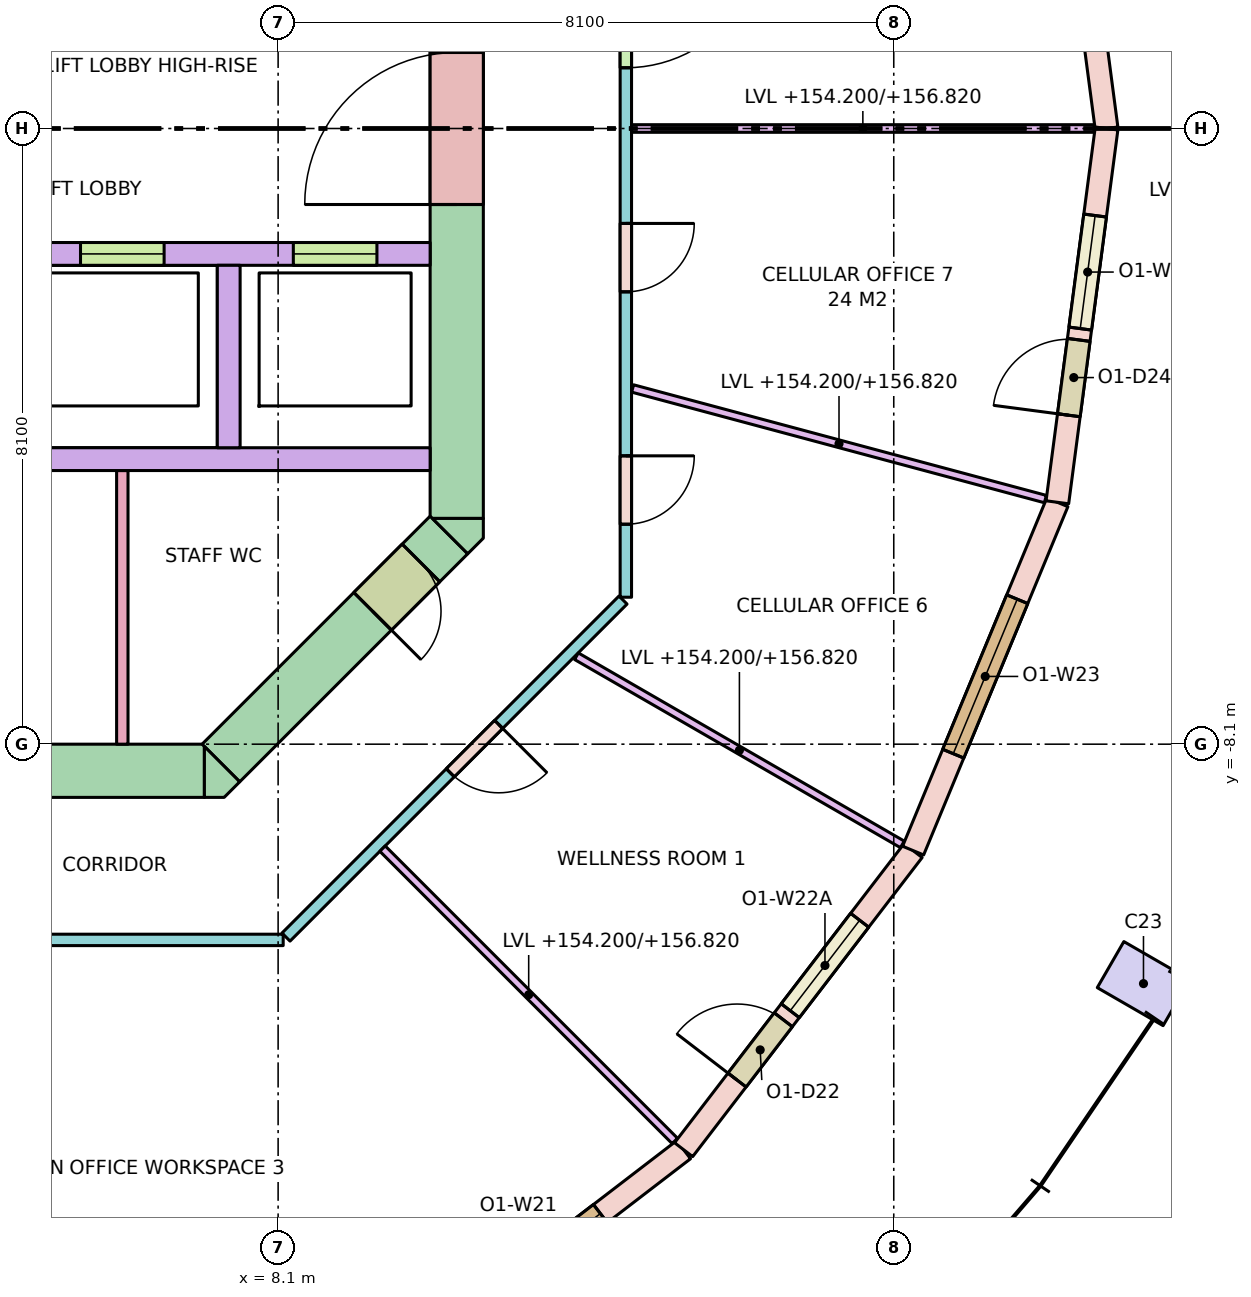
"""IFC4 building model, lengths in metres.
Left out: names, types, materials, properties, quantities, classifications, styles, units other than length and angle.
Written with IfcOpenShell. Run it as: python <this file> out.ifc"""

import sys

from ifc_helpers import new_model, si_unit, direction, frame, frame_2d, origin, origin_2d, place, context, subcontext, project, spatial, polyline, rectangle, outline, extrude, element, fill, save


model = new_model("IFC4")
c1 = context("Model", 3, precision=1e-05, world=origin(), true_north=direction((0.0, 1.0)))
c2 = subcontext(c1, "Body", "Model", "MODEL_VIEW")
j1 = project(units=[si_unit("LENGTHUNIT", "METRE"), si_unit("PLANEANGLEUNIT", "RADIAN")], contexts=[c1])
p1 = place(None, origin())
s1 = spatial("IfcSite", under=j1, at=p1, CompositionType="ELEMENT")
p2 = place(p1, origin())
s2 = spatial("IfcBuilding", under=s1, at=p2, CompositionType="ELEMENT")
p3 = place(p2, frame((0.0, 0.0, 154.2)))
s3 = spatial("IfcBuildingStorey", under=s2, at=p3, CompositionType="ELEMENT", Elevation=154.2)
p4 = place(p3, frame((19.486, -11.25, 0.0), z_axis=(0.0, 0.0, 1.0), x_axis=(0.5, 0.866025403784, 0.0)))
e1 = element("IfcColumn", 1, at=p4, inside=s3, PredefinedType="COLUMN", context=c2, shape_type="SweptSolid", body=[
    extrude(rectangle(XDim=0.7, YDim=1.0, at=origin_2d()), origin(), (0.0, 0.0, 1.0), 3.7),
])
p5 = place(p3, frame((-7.13, -8.45, -0.28), z_axis=(0.0, 0.0, 1.0), x_axis=(1.0, 0.0, 0.0)))
e2 = element("IfcWall", 2, at=p5, inside=s3, PredefinedType="SHEAR", context=c2, shape_type="SweptSolid", body=[
    extrude(rectangle(XDim=14.26, YDim=0.7, at=frame_2d((7.13, 0.0))), origin(), (0.0, 0.0, 1.0), 3.7),
])
p6 = place(p5, frame((8.08, 0.0, 0.28)))
e3 = element("IfcOpeningElement", 3, at=p6, cuts=e2, PredefinedType="OPENING", context=c2, shape_type="SweptSolid", body=[
    extrude(rectangle(XDim=0.7, YDim=2.1, at=frame_2d((0.35, 1.05))), frame((0.0, 0.36, 0.0), z_axis=(0.0, -1.0, 0.0), x_axis=(1.0, 0.0, 0.0)), (0.0, 0.0, 1.0), 0.72),
])
p7 = place(p5, frame((6.205, 0.0, 0.28)))
e4 = element("IfcOpeningElement", 4, at=p7, cuts=e2, PredefinedType="OPENING", context=c2, shape_type="SweptSolid", body=[
    extrude(rectangle(XDim=0.9, YDim=2.1, at=frame_2d((0.45, 1.05))), frame((0.0, 0.36, 0.0), z_axis=(0.0, -1.0, 0.0), x_axis=(1.0, 0.0, 0.0)), (0.0, 0.0, 1.0), 0.72),
])
p8 = place(p5, frame((10.667, 0.0, 0.28)))
e5 = element("IfcOpeningElement", 5, at=p8, cuts=e2, PredefinedType="OPENING", context=c2, shape_type="SweptSolid", body=[
    extrude(rectangle(XDim=0.9, YDim=2.1, at=frame_2d((0.45, 1.05))), frame((0.0, 0.36, 0.0), z_axis=(0.0, -1.0, 0.0), x_axis=(1.0, 0.0, 0.0)), (0.0, 0.0, 1.0), 0.72),
])
p9 = place(p3, frame((10.45, -5.13, -0.28), z_axis=(0.0, 0.0, 1.0), x_axis=(0.0, 1.0, 0.0)))
e6 = element("IfcWall", 6, at=p9, inside=s3, PredefinedType="SHEAR", context=c2, shape_type="SweptSolid", body=[
    extrude(rectangle(XDim=10.26, YDim=0.7, at=frame_2d((5.13, 0.0))), origin(), (0.0, 0.0, 1.0), 3.7),
])
p10 = place(p9, frame((4.13, 0.0, 0.28)))
e7 = element("IfcOpeningElement", 7, at=p10, cuts=e6, PredefinedType="OPENING", context=c2, shape_type="SweptSolid", body=[
    extrude(rectangle(XDim=2.0, YDim=2.1, at=frame_2d((1.0, 1.05))), frame((0.0, 0.36, 0.0), z_axis=(0.0, -1.0, 0.0), x_axis=(1.0, 0.0, 0.0)), (0.0, 0.0, 1.0), 0.72),
])
p11 = place(p3, frame((10.347, -5.347, -0.28), z_axis=(0.0, 0.0, 1.0), x_axis=(-0.707106781187, -0.707106781187, 0.0)))
e8 = element("IfcWall", 8, at=p11, inside=s3, PredefinedType="SHEAR", context=c2, shape_type="SweptSolid", body=[
    extrude(rectangle(XDim=4.243, YDim=0.7, at=frame_2d((2.121, 0.0))), origin(), (0.0, 0.0, 1.0), 3.7),
])
p12 = place(p11, frame((0.52, 0.0, 0.28)))
e9 = element("IfcOpeningElement", 9, at=p12, cuts=e8, PredefinedType="OPENING", context=c2, shape_type="SweptSolid", body=[
    extrude(rectangle(XDim=0.9, YDim=2.1, at=frame_2d((0.45, 1.05))), frame((0.0, 0.36, 0.0), z_axis=(0.0, -1.0, 0.0), x_axis=(1.0, 0.0, 0.0)), (0.0, 0.0, 1.0), 0.72),
])
p13 = place(p3, frame((0.0, 0.0, -0.28)))
e10 = element("IfcWall", 10, at=p13, inside=s3, PredefinedType="SHEAR", context=c2, shape_type="SweptSolid", body=[
    extrude(outline(polyline([(7.39, -8.8), (7.13, -8.8), (7.13, -8.8), (7.13, -8.13), (7.595, -8.595), (7.595, -8.595), (7.595, -8.595), (7.39, -8.8)])), origin(), (0.0, 0.0, 1.0), 3.7),
])
p14 = place(p3, frame((0.0, 0.0, -0.28)))
e11 = element("IfcWall", 11, at=p14, inside=s3, PredefinedType="SHEAR", context=c2, shape_type="SweptSolid", body=[
    extrude(outline(polyline([(10.8, -5.39), (10.595, -5.595), (10.595, -5.595), (10.595, -5.595), (10.13, -5.13), (10.8, -5.13), (10.8, -5.13), (10.8, -5.39)])), origin(), (0.0, 0.0, 1.0), 3.7),
])
p15 = place(p3, frame((2.0, -4.35, 0.0), z_axis=(0.0, 0.0, 1.0), x_axis=(1.0, 0.0, 0.0)))
e12 = element("IfcWall", 12, at=p15, inside=s3, PredefinedType="SOLIDWALL", context=c2, shape_type="SweptSolid", body=[
    extrude(rectangle(XDim=8.1, YDim=0.3, at=frame_2d((4.05, 0.0))), origin(), (0.0, 0.0, 1.0), 3.42),
])
p16 = place(p3, frame((2.0, -1.65, 0.0), z_axis=(0.0, 0.0, 1.0), x_axis=(1.0, 0.0, 0.0)))
e13 = element("IfcWall", 13, at=p16, inside=s3, PredefinedType="SOLIDWALL", context=c2, shape_type="SweptSolid", body=[
    extrude(rectangle(XDim=8.1, YDim=0.3, at=frame_2d((4.05, 0.0))), origin(), (0.0, 0.0, 1.0), 3.42),
])
p17 = place(p16, frame((0.85, 0.0, 0.0)))
e14 = element("IfcOpeningElement", 14, at=p17, cuts=e13, PredefinedType="OPENING", context=c2, shape_type="SweptSolid", body=[
    extrude(rectangle(XDim=1.1, YDim=2.1, at=frame_2d((0.55, 1.05))), frame((0.0, 0.16, 0.0), z_axis=(0.0, -1.0, 0.0), x_axis=(1.0, 0.0, 0.0)), (0.0, 0.0, 1.0), 0.32),
])
p18 = place(p16, frame((3.5, 0.0, 0.0)))
e15 = element("IfcOpeningElement", 15, at=p18, cuts=e13, PredefinedType="OPENING", context=c2, shape_type="SweptSolid", body=[
    extrude(rectangle(XDim=1.1, YDim=2.1, at=frame_2d((0.55, 1.05))), frame((0.0, 0.16, 0.0), z_axis=(0.0, -1.0, 0.0), x_axis=(1.0, 0.0, 0.0)), (0.0, 0.0, 1.0), 0.32),
])
p19 = place(p16, frame((6.3, 0.0, 0.0)))
e16 = element("IfcOpeningElement", 16, at=p19, cuts=e13, PredefinedType="OPENING", context=c2, shape_type="SweptSolid", body=[
    extrude(rectangle(XDim=1.1, YDim=2.1, at=frame_2d((0.55, 1.05))), frame((0.0, 0.16, 0.0), z_axis=(0.0, -1.0, 0.0), x_axis=(1.0, 0.0, 0.0)), (0.0, 0.0, 1.0), 0.32),
])
p20 = place(p3, frame((7.45, -4.2, 0.0), z_axis=(0.0, 0.0, 1.0), x_axis=(0.0, 1.0, 0.0)))
e17 = element("IfcWall", 17, at=p20, inside=s3, PredefinedType="SOLIDWALL", context=c2, shape_type="SweptSolid", body=[
    extrude(rectangle(XDim=2.4, YDim=0.3, at=frame_2d((1.2, 0.0))), origin(), (0.0, 0.0, 1.0), 3.42),
])
p21 = place(p3, frame((19.0, 0.0, 0.0), z_axis=(0.0, 0.0, 1.0), x_axis=(-0.130538549191, 0.991443234469, 0.0)))
e18 = element("IfcWall", 18, at=p21, inside=s3, PredefinedType="STANDARD", context=c2, shape_type="SweptSolid", body=[
    extrude(rectangle(XDim=4.96, YDim=0.3, at=frame_2d((2.48, 0.0))), origin(), (0.0, 0.0, 1.0), 3.42),
])
p22 = place(p21, frame((1.38, 0.0, 0.8)))
e19 = element("IfcOpeningElement", 19, at=p22, cuts=e18, PredefinedType="OPENING", context=c2, shape_type="SweptSolid", body=[
    extrude(rectangle(XDim=2.2, YDim=2.4, at=frame_2d((1.1, 1.2))), frame((0.0, 0.16, 0.0), z_axis=(0.0, -1.0, 0.0), x_axis=(1.0, 0.0, 0.0)), (0.0, 0.0, 1.0), 0.32),
])
p23 = place(p3, frame((9.5, -16.455, 0.0), z_axis=(0.0, 0.0, 1.0), x_axis=(0.793348024649, 0.608768356425, 0.0)))
e20 = element("IfcWall", 20, at=p23, inside=s3, PredefinedType="STANDARD", context=c2, shape_type="SweptSolid", body=[
    extrude(rectangle(XDim=4.96, YDim=0.3, at=frame_2d((2.48, 0.0))), origin(), (0.0, 0.0, 1.0), 3.42),
])
p24 = place(p23, frame((1.38, 0.0, 0.8)))
e21 = element("IfcOpeningElement", 21, at=p24, cuts=e20, PredefinedType="OPENING", context=c2, shape_type="SweptSolid", body=[
    extrude(rectangle(XDim=2.2, YDim=2.4, at=frame_2d((1.1, 1.2))), frame((0.0, 0.16, 0.0), z_axis=(0.0, -1.0, 0.0), x_axis=(1.0, 0.0, 0.0)), (0.0, 0.0, 1.0), 0.32),
])
p25 = place(p3, frame((13.435, -13.435, 0.0), z_axis=(0.0, 0.0, 1.0), x_axis=(0.608768356425, 0.793348024649, 0.0)))
e22 = element("IfcWall", 22, at=p25, inside=s3, PredefinedType="STANDARD", context=c2, shape_type="SweptSolid", body=[
    extrude(rectangle(XDim=4.96, YDim=0.3, at=frame_2d((2.48, 0.0))), origin(), (0.0, 0.0, 1.0), 3.42),
])
p26 = place(p25, frame((1.155, 0.0, 0.0)))
e23 = element("IfcOpeningElement", 23, at=p26, cuts=e22, PredefinedType="OPENING", context=c2, shape_type="SweptSolid", body=[
    extrude(rectangle(XDim=1.0, YDim=2.4, at=frame_2d((0.5, 1.2))), frame((0.0, 0.16, 0.0), z_axis=(0.0, -1.0, 0.0), x_axis=(1.0, 0.0, 0.0)), (0.0, 0.0, 1.0), 0.32),
])
p27 = place(p25, frame((2.305, 0.0, 0.8)))
e24 = element("IfcOpeningElement", 24, at=p27, cuts=e22, PredefinedType="OPENING", context=c2, shape_type="SweptSolid", body=[
    extrude(rectangle(XDim=1.5, YDim=2.4, at=frame_2d((0.75, 1.2))), frame((0.0, 0.16, 0.0), z_axis=(0.0, -1.0, 0.0), x_axis=(1.0, 0.0, 0.0)), (0.0, 0.0, 1.0), 0.32),
])
p28 = place(p3, frame((16.455, -9.5, 0.0), z_axis=(0.0, 0.0, 1.0), x_axis=(0.382650301762, 0.923893254961, 0.0)))
e25 = element("IfcWall", 25, at=p28, inside=s3, PredefinedType="STANDARD", context=c2, shape_type="SweptSolid", body=[
    extrude(rectangle(XDim=4.96, YDim=0.3, at=frame_2d((2.48, 0.0))), origin(), (0.0, 0.0, 1.0), 3.42),
])
p29 = place(p28, frame((1.38, 0.0, 0.8)))
e26 = element("IfcOpeningElement", 26, at=p29, cuts=e25, PredefinedType="OPENING", context=c2, shape_type="SweptSolid", body=[
    extrude(rectangle(XDim=2.2, YDim=2.4, at=frame_2d((1.1, 1.2))), frame((0.0, 0.16, 0.0), z_axis=(0.0, -1.0, 0.0), x_axis=(1.0, 0.0, 0.0)), (0.0, 0.0, 1.0), 0.32),
])
p30 = place(p3, frame((18.353, -4.917, 0.0), z_axis=(0.0, 0.0, 1.0), x_axis=(0.130538549191, 0.991443234469, 0.0)))
e27 = element("IfcWall", 27, at=p30, inside=s3, PredefinedType="STANDARD", context=c2, shape_type="SweptSolid", body=[
    extrude(rectangle(XDim=4.96, YDim=0.3, at=frame_2d((2.48, 0.0))), origin(), (0.0, 0.0, 1.0), 3.42),
])
p31 = place(p30, frame((1.155, 0.0, 0.0)))
e28 = element("IfcOpeningElement", 28, at=p31, cuts=e27, PredefinedType="OPENING", context=c2, shape_type="SweptSolid", body=[
    extrude(rectangle(XDim=1.0, YDim=2.4, at=frame_2d((0.5, 1.2))), frame((0.0, 0.16, 0.0), z_axis=(0.0, -1.0, 0.0), x_axis=(1.0, 0.0, 0.0)), (0.0, 0.0, 1.0), 0.32),
])
p32 = place(p30, frame((2.305, 0.0, 0.8)))
e29 = element("IfcOpeningElement", 29, at=p32, cuts=e27, PredefinedType="OPENING", context=c2, shape_type="SweptSolid", body=[
    extrude(rectangle(XDim=1.5, YDim=2.4, at=frame_2d((0.75, 1.2))), frame((0.0, 0.16, 0.0), z_axis=(0.0, -1.0, 0.0), x_axis=(1.0, 0.0, 0.0)), (0.0, 0.0, 1.0), 0.32),
])
p33 = place(p3, frame((6.05, -8.1, 0.0), z_axis=(0.0, 0.0, 1.0), x_axis=(0.0, 1.0, 0.0)))
e30 = element("IfcWall", 30, at=p33, inside=s3, PredefinedType="PARTITIONING", context=c2, shape_type="SweptSolid", body=[
    extrude(rectangle(XDim=3.6, YDim=0.15, at=frame_2d((1.8, 0.0))), origin(), (0.0, 0.0, 1.0), 3.42),
])
p34 = place(p3, frame((12.638, -6.204, 0.0), z_axis=(0.0, 0.0, 1.0), x_axis=(-0.707106781187, -0.707106781187, 0.0)))
e31 = element("IfcWall", 31, at=p34, inside=s3, PredefinedType="PARTITIONING", context=c2, shape_type="SweptSolid", body=[
    extrude(rectangle(XDim=6.271, YDim=0.15, at=frame_2d((3.135, 0.0))), origin(), (0.0, 0.0, 1.0), 2.62),
])
p35 = place(p34, frame((2.314, 0.0, 0.0)))
e32 = element("IfcOpeningElement", 32, at=p35, cuts=e31, PredefinedType="OPENING", context=c2, shape_type="SweptSolid", body=[
    extrude(rectangle(XDim=0.9, YDim=2.1, at=frame_2d((0.45, 1.05))), frame((0.0, 0.085, 0.0), z_axis=(0.0, -1.0, 0.0), x_axis=(1.0, 0.0, 0.0)), (0.0, 0.0, 1.0), 0.17),
])
p36 = place(p3, frame((8.167, -10.675, 0.0), z_axis=(0.0, 0.0, 1.0), x_axis=(-1.0, 0.0, 0.0)))
e33 = element("IfcWall", 33, at=p36, inside=s3, PredefinedType="PARTITIONING", context=c2, shape_type="SweptSolid", body=[
    extrude(rectangle(XDim=11.027, YDim=0.15, at=frame_2d((5.513, 0.0))), origin(), (0.0, 0.0, 1.0), 2.62),
])
p37 = place(p36, frame((4.614, 0.0, 0.0)))
e34 = element("IfcOpeningElement", 34, at=p37, cuts=e33, PredefinedType="OPENING", context=c2, shape_type="SweptSolid", body=[
    extrude(rectangle(XDim=1.8, YDim=2.1, at=frame_2d((0.9, 1.05))), frame((0.0, 0.085, 0.0), z_axis=(0.0, -1.0, 0.0), x_axis=(1.0, 0.0, 0.0)), (0.0, 0.0, 1.0), 0.17),
])
p38 = place(p3, frame((12.675, 6.167, 0.0), z_axis=(0.0, 0.0, 1.0), x_axis=(0.0, -1.0, 0.0)))
e35 = element("IfcWall", 35, at=p38, inside=s3, PredefinedType="PARTITIONING", context=c2, shape_type="SweptSolid", body=[
    extrude(rectangle(XDim=12.333, YDim=0.15, at=frame_2d((6.167, 0.0))), origin(), (0.0, 0.0, 1.0), 2.62),
])
p39 = place(p38, frame((3.568, 0.0, 0.0)))
e36 = element("IfcOpeningElement", 36, at=p39, cuts=e35, PredefinedType="OPENING", context=c2, shape_type="SweptSolid", body=[
    extrude(rectangle(XDim=1.8, YDim=2.1, at=frame_2d((0.9, 1.05))), frame((0.0, 0.085, 0.0), z_axis=(0.0, -1.0, 0.0), x_axis=(1.0, 0.0, 0.0)), (0.0, 0.0, 1.0), 0.17),
])
p40 = place(p38, frame((0.96, 0.0, 0.0)))
e37 = element("IfcOpeningElement", 37, at=p40, cuts=e35, PredefinedType="OPENING", context=c2, shape_type="SweptSolid", body=[
    extrude(rectangle(XDim=0.9, YDim=2.1, at=frame_2d((0.45, 1.05))), frame((0.0, 0.085, 0.0), z_axis=(0.0, -1.0, 0.0), x_axis=(1.0, 0.0, 0.0)), (0.0, 0.0, 1.0), 0.17),
])
p41 = place(p38, frame((10.473, 0.0, 0.0)))
e38 = element("IfcOpeningElement", 38, at=p41, cuts=e35, PredefinedType="OPENING", context=c2, shape_type="SweptSolid", body=[
    extrude(rectangle(XDim=0.9, YDim=2.1, at=frame_2d((0.45, 1.05))), frame((0.0, 0.085, 0.0), z_axis=(0.0, -1.0, 0.0), x_axis=(1.0, 0.0, 0.0)), (0.0, 0.0, 1.0), 0.17),
])
p42 = place(p38, frame((7.416, 0.0, 0.0)))
e39 = element("IfcOpeningElement", 39, at=p42, cuts=e35, PredefinedType="OPENING", context=c2, shape_type="SweptSolid", body=[
    extrude(rectangle(XDim=0.9, YDim=2.1, at=frame_2d((0.45, 1.05))), frame((0.0, 0.085, 0.0), z_axis=(0.0, -1.0, 0.0), x_axis=(1.0, 0.0, 0.0)), (0.0, 0.0, 1.0), 0.17),
])
p43 = place(p3, frame((12.75, 0.0, 0.0), z_axis=(0.0, 0.0, 1.0), x_axis=(1.0, 0.0, 0.0)))
e40 = element("IfcWall", 40, at=p43, inside=s3, PredefinedType="PARTITIONING", context=c2, shape_type="SweptSolid", body=[
    extrude(rectangle(XDim=6.087, YDim=0.1, at=frame_2d((3.043, 0.0))), origin(), (0.0, 0.0, 1.0), 2.62),
])
p44 = place(p3, frame((9.474, -9.474, 0.0), z_axis=(0.0, 0.0, 1.0), x_axis=(0.707106781187, -0.707106781187, 0.0)))
e41 = element("IfcWall", 41, at=p44, inside=s3, PredefinedType="PARTITIONING", context=c2, shape_type="SweptSolid", body=[
    extrude(rectangle(XDim=5.439, YDim=0.1, at=frame_2d((2.719, 0.0))), origin(), (0.0, 0.0, 1.0), 2.62),
])
p45 = place(p3, frame((12.025, -6.943, 0.0), z_axis=(0.0, 0.0, 1.0), x_axis=(0.866025463095, -0.499999897272, 0.0)))
e42 = element("IfcWall", 42, at=p45, inside=s3, PredefinedType="PARTITIONING", context=c2, shape_type="SweptSolid", body=[
    extrude(rectangle(XDim=4.951, YDim=0.1, at=frame_2d((2.476, 0.0))), origin(), (0.0, 0.0, 1.0), 2.62),
])
p46 = place(p3, frame((12.764, -3.42, 0.0), z_axis=(0.0, 0.0, 1.0), x_axis=(0.965925759926, -0.258819292773, 0.0)))
e43 = element("IfcWall", 43, at=p46, inside=s3, PredefinedType="PARTITIONING", context=c2, shape_type="SweptSolid", body=[
    extrude(rectangle(XDim=5.622, YDim=0.1, at=frame_2d((2.811, 0.0))), origin(), (0.0, 0.0, 1.0), 2.62),
])
p47 = place(p24, origin())
e44 = element("IfcWindow", 44, at=p47, inside=s3, PartitioningType="SINGLE_PANEL", PredefinedType="WINDOW", context=c2, shape_type="SweptSolid", body=[
    extrude(rectangle(XDim=2.2, YDim=2.4, at=frame_2d((1.1, 1.2))), frame((0.0, 0.03, 0.0), z_axis=(0.0, -1.0, 0.0), x_axis=(1.0, 0.0, 0.0)), (0.0, 0.0, 1.0), 0.06),
])
fill(e21, e44)
p48 = place(p26, origin())
e45 = element("IfcDoor", 45, at=p48, inside=s3, OperationType="SINGLE_SWING_LEFT", PredefinedType="DOOR", context=c2, shape_type="SweptSolid", body=[
    extrude(rectangle(XDim=1.0, YDim=2.4, at=frame_2d((0.5, 1.2))), frame((0.0, 0.025, 0.0), z_axis=(0.0, -1.0, 0.0), x_axis=(1.0, 0.0, 0.0)), (0.0, 0.0, 1.0), 0.05),
])
fill(e23, e45)
p49 = place(p27, origin())
e46 = element("IfcWindow", 46, at=p49, inside=s3, PartitioningType="SINGLE_PANEL", PredefinedType="WINDOW", context=c2, shape_type="SweptSolid", body=[
    extrude(rectangle(XDim=1.5, YDim=2.4, at=frame_2d((0.75, 1.2))), frame((0.0, 0.03, 0.0), z_axis=(0.0, -1.0, 0.0), x_axis=(1.0, 0.0, 0.0)), (0.0, 0.0, 1.0), 0.06),
])
fill(e24, e46)
p50 = place(p29, origin())
e47 = element("IfcWindow", 47, at=p50, inside=s3, PartitioningType="SINGLE_PANEL", PredefinedType="WINDOW", context=c2, shape_type="SweptSolid", body=[
    extrude(rectangle(XDim=2.2, YDim=2.4, at=frame_2d((1.1, 1.2))), frame((0.0, 0.03, 0.0), z_axis=(0.0, -1.0, 0.0), x_axis=(1.0, 0.0, 0.0)), (0.0, 0.0, 1.0), 0.06),
])
fill(e26, e47)
p51 = place(p31, origin())
e48 = element("IfcDoor", 48, at=p51, inside=s3, OperationType="SINGLE_SWING_LEFT", PredefinedType="DOOR", context=c2, shape_type="SweptSolid", body=[
    extrude(rectangle(XDim=1.0, YDim=2.4, at=frame_2d((0.5, 1.2))), frame((0.0, 0.025, 0.0), z_axis=(0.0, -1.0, 0.0), x_axis=(1.0, 0.0, 0.0)), (0.0, 0.0, 1.0), 0.05),
])
fill(e28, e48)
p52 = place(p32, origin())
e49 = element("IfcWindow", 49, at=p52, inside=s3, PartitioningType="SINGLE_PANEL", PredefinedType="WINDOW", context=c2, shape_type="SweptSolid", body=[
    extrude(rectangle(XDim=1.5, YDim=2.4, at=frame_2d((0.75, 1.2))), frame((0.0, 0.03, 0.0), z_axis=(0.0, -1.0, 0.0), x_axis=(1.0, 0.0, 0.0)), (0.0, 0.0, 1.0), 0.06),
])
fill(e29, e49)
p53 = place(p18, origin())
e50 = element("IfcDoor", 50, at=p53, inside=s3, OperationType="DOUBLE_DOOR_SLIDING", PredefinedType="DOOR", context=c2, shape_type="SweptSolid", body=[
    extrude(rectangle(XDim=1.1, YDim=2.1, at=frame_2d((0.55, 1.05))), frame((0.0, 0.025, 0.0), z_axis=(0.0, -1.0, 0.0), x_axis=(1.0, 0.0, 0.0)), (0.0, 0.0, 1.0), 0.05),
])
fill(e15, e50)
p54 = place(p19, origin())
e51 = element("IfcDoor", 51, at=p54, inside=s3, OperationType="DOUBLE_DOOR_SLIDING", PredefinedType="DOOR", context=c2, shape_type="SweptSolid", body=[
    extrude(rectangle(XDim=1.1, YDim=2.1, at=frame_2d((0.55, 1.05))), frame((0.0, 0.025, 0.0), z_axis=(0.0, -1.0, 0.0), x_axis=(1.0, 0.0, 0.0)), (0.0, 0.0, 1.0), 0.05),
])
fill(e16, e51)
p55 = place(p10, origin())
e52 = element("IfcDoor", 52, at=p55, inside=s3, OperationType="DOUBLE_DOOR_SINGLE_SWING", PredefinedType="DOOR", context=c2, shape_type="SweptSolid", body=[
    extrude(rectangle(XDim=2.0, YDim=2.1, at=frame_2d((1.0, 1.05))), frame((0.0, 0.025, 0.0), z_axis=(0.0, -1.0, 0.0), x_axis=(1.0, 0.0, 0.0)), (0.0, 0.0, 1.0), 0.05),
])
fill(e7, e52)
p56 = place(p12, origin())
e53 = element("IfcDoor", 53, at=p56, inside=s3, OperationType="SINGLE_SWING_RIGHT", PredefinedType="DOOR", context=c2, shape_type="SweptSolid", body=[
    extrude(rectangle(XDim=0.9, YDim=2.1, at=frame_2d((0.45, 1.05))), frame((0.0, 0.025, 0.0), z_axis=(0.0, -1.0, 0.0), x_axis=(1.0, 0.0, 0.0)), (0.0, 0.0, 1.0), 0.05),
])
fill(e9, e53)
p57 = place(p39, origin())
e54 = element("IfcDoor", 54, at=p57, inside=s3, OperationType="DOUBLE_DOOR_SINGLE_SWING", PredefinedType="DOOR", context=c2, shape_type="SweptSolid", body=[
    extrude(rectangle(XDim=1.8, YDim=2.1, at=frame_2d((0.9, 1.05))), frame((0.0, 0.025, 0.0), z_axis=(0.0, -1.0, 0.0), x_axis=(1.0, 0.0, 0.0)), (0.0, 0.0, 1.0), 0.05),
])
fill(e36, e54)
p58 = place(p35, origin())
e55 = element("IfcDoor", 55, at=p58, inside=s3, OperationType="SINGLE_SWING_LEFT", PredefinedType="DOOR", context=c2, shape_type="SweptSolid", body=[
    extrude(rectangle(XDim=0.9, YDim=2.1, at=frame_2d((0.45, 1.05))), frame((0.0, 0.025, 0.0), z_axis=(0.0, -1.0, 0.0), x_axis=(1.0, 0.0, 0.0)), (0.0, 0.0, 1.0), 0.05),
])
fill(e32, e55)
p59 = place(p41, origin())
e56 = element("IfcDoor", 56, at=p59, inside=s3, OperationType="SINGLE_SWING_LEFT", PredefinedType="DOOR", context=c2, shape_type="SweptSolid", body=[
    extrude(rectangle(XDim=0.9, YDim=2.1, at=frame_2d((0.45, 1.05))), frame((0.0, 0.025, 0.0), z_axis=(0.0, -1.0, 0.0), x_axis=(1.0, 0.0, 0.0)), (0.0, 0.0, 1.0), 0.05),
])
fill(e38, e56)
p60 = place(p42, origin())
e57 = element("IfcDoor", 57, at=p60, inside=s3, OperationType="SINGLE_SWING_LEFT", PredefinedType="DOOR", context=c2, shape_type="SweptSolid", body=[
    extrude(rectangle(XDim=0.9, YDim=2.1, at=frame_2d((0.45, 1.05))), frame((0.0, 0.025, 0.0), z_axis=(0.0, -1.0, 0.0), x_axis=(1.0, 0.0, 0.0)), (0.0, 0.0, 1.0), 0.05),
])
fill(e39, e57)
save(model, sys.argv[1])
